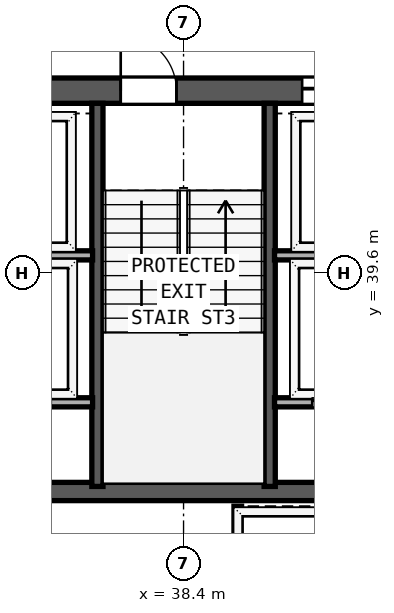
"""IFC4 building model, lengths in metres.
Left out: names, types, materials, properties, quantities, classifications, styles, units other than length and angle.
Written with IfcOpenShell. Run it as: python <this file> out.ifc"""

import sys

from ifc_helpers import new_model, si_unit, direction, frame, frame_2d, origin, place, context, subcontext, project, spatial, rectangle, extrude, element, fill, save


model = new_model("IFC4")
c1 = context("Model", 3, precision=1e-05, world=origin(), true_north=direction((0.0, 1.0)))
c2 = subcontext(c1, "Body", "Model", "MODEL_VIEW")
j1 = project(units=[si_unit("LENGTHUNIT", "METRE"), si_unit("PLANEANGLEUNIT", "RADIAN")], contexts=[c1])
p1 = place(None, origin())
s1 = spatial("IfcSite", under=j1, at=p1, CompositionType="ELEMENT")
p2 = place(p1, origin())
s2 = spatial("IfcBuilding", under=s1, at=p2, CompositionType="ELEMENT")
p3 = place(p2, frame((0.0, 0.0, 258.3)))
s3 = spatial("IfcBuildingStorey", under=s2, at=p3, CompositionType="ELEMENT", Elevation=258.3)
p4 = place(p3, frame((29.75, 43.2, 0.0), z_axis=(0.0, 0.0, 1.0), x_axis=(1.0, 0.0, 0.0)))
e1 = element("IfcWall", 1, at=p4, inside=s3, PredefinedType="SHEAR", context=c2, shape_type="SweptSolid", body=[
    extrude(rectangle(XDim=17.3, YDim=0.5, at=frame_2d((8.65, 0.0))), origin(), (0.0, 0.0, 1.0), 3.67),
])
p5 = place(p4, frame((2.3, 0.0, 0.0)))
e2 = element("IfcOpeningElement", 2, at=p5, cuts=e1, PredefinedType="OPENING", context=c2, shape_type="SweptSolid", body=[
    extrude(rectangle(XDim=1.1, YDim=2.15, at=frame_2d((0.55, 1.075))), frame((0.0, 0.26, 0.0), z_axis=(0.0, -1.0, 0.0), x_axis=(1.0, 0.0, 0.0)), (0.0, 0.0, 1.0), 0.52),
])
p6 = place(p4, frame((7.41, 0.0, 0.0)))
e3 = element("IfcOpeningElement", 3, at=p6, cuts=e1, PredefinedType="OPENING", context=c2, shape_type="SweptSolid", body=[
    extrude(rectangle(XDim=1.1, YDim=2.15, at=frame_2d((0.55, 1.075))), frame((0.0, 0.26, 0.0), z_axis=(0.0, -1.0, 0.0), x_axis=(1.0, 0.0, 0.0)), (0.0, 0.0, 1.0), 0.52),
])
p7 = place(p4, frame((13.5, 0.0, 0.0)))
e4 = element("IfcOpeningElement", 4, at=p7, cuts=e1, PredefinedType="OPENING", context=c2, shape_type="SweptSolid", body=[
    extrude(rectangle(XDim=1.1, YDim=2.15, at=frame_2d((0.55, 1.075))), frame((0.0, 0.26, 0.0), z_axis=(0.0, -1.0, 0.0), x_axis=(1.0, 0.0, 0.0)), (0.0, 0.0, 1.0), 0.52),
])
p8 = place(p4, frame((4.63, 0.0, 0.0)))
e5 = element("IfcOpeningElement", 5, at=p8, cuts=e1, PredefinedType="OPENING", context=c2, shape_type="SweptSolid", body=[
    extrude(rectangle(XDim=1.1, YDim=2.2, at=frame_2d((0.55, 1.1))), frame((0.0, 0.26, 0.0), z_axis=(0.0, -1.0, 0.0), x_axis=(1.0, 0.0, 0.0)), (0.0, 0.0, 1.0), 0.52),
])
p9 = place(p4, frame((10.99, 0.0, 0.0)))
e6 = element("IfcOpeningElement", 6, at=p9, cuts=e1, PredefinedType="OPENING", context=c2, shape_type="SweptSolid", body=[
    extrude(rectangle(XDim=1.1, YDim=2.2, at=frame_2d((0.55, 1.1))), frame((0.0, 0.26, 0.0), z_axis=(0.0, -1.0, 0.0), x_axis=(1.0, 0.0, 0.0)), (0.0, 0.0, 1.0), 0.52),
])
p10 = place(p3, frame((30.25, 35.29, 0.0), z_axis=(0.0, 0.0, 1.0), x_axis=(1.0, 0.0, 0.0)))
e7 = element("IfcWall", 7, at=p10, inside=s3, PredefinedType="SHEAR", context=c2, shape_type="SweptSolid", body=[
    extrude(rectangle(XDim=16.3, YDim=0.36, at=frame_2d((8.15, 0.0))), origin(), (0.0, 0.0, 1.0), 3.67),
])
p11 = place(p10, frame((5.1, 0.0, 0.0), z_axis=(0.0, 0.0, 1.0), x_axis=(-1.0, 0.0, 0.0)))
e8 = element("IfcOpeningElement", 8, at=p11, cuts=e7, PredefinedType="OPENING", context=c2, shape_type="SweptSolid", body=[
    extrude(rectangle(XDim=0.9, YDim=2.1, at=frame_2d((0.45, 1.05))), frame((0.0, 0.19, 0.0), z_axis=(0.0, -1.0, 0.0), x_axis=(1.0, 0.0, 0.0)), (0.0, 0.0, 1.0), 0.38),
])
p12 = place(p10, frame((12.16, 0.0, 0.0), z_axis=(0.0, 0.0, 1.0), x_axis=(-1.0, 0.0, 0.0)))
e9 = element("IfcOpeningElement", 9, at=p12, cuts=e7, PredefinedType="OPENING", context=c2, shape_type="SweptSolid", body=[
    extrude(rectangle(XDim=0.9, YDim=2.1, at=frame_2d((0.45, 1.05))), frame((0.0, 0.19, 0.0), z_axis=(0.0, -1.0, 0.0), x_axis=(1.0, 0.0, 0.0)), (0.0, 0.0, 1.0), 0.38),
])
for number, where, z_axis, x_axis in (
    (10, (36.7, 35.39, 0.0), (0.0, 0.0, 1.0), (0.0, 1.0, 0.0)),
    (11, (40.1, 35.39, 0.0), (0.0, 0.0, 1.0), (0.0, 1.0, 0.0)),
):
    element("IfcWall", number, at=place(p3, frame(where, z_axis=z_axis, x_axis=x_axis)), inside=s3, PredefinedType="SHEAR", context=c2, shape_type="SweptSolid", body=[
        extrude(rectangle(XDim=7.56, YDim=0.22, at=frame_2d((3.78, 0.0))), origin(), (0.0, 0.0, 1.0), 3.67),
    ])
for number, where, z_axis, x_axis in (
    (12, (33.835, 39.95, 0.0), (0.0, 0.0, 1.0), (1.0, 0.0, 0.0)),
    (13, (40.195, 39.95, 0.0), (0.0, 0.0, 1.0), (1.0, 0.0, 0.0)),
):
    element("IfcWall", number, at=place(p3, frame(where, z_axis=z_axis, x_axis=x_axis)), inside=s3, PredefinedType="SOLIDWALL", context=c2, shape_type="SweptSolid", body=[
        extrude(rectangle(XDim=2.77, YDim=0.18, at=frame_2d((1.385, 0.0))), origin(), (0.0, 0.0, 1.0), 3.67),
    ])
p13 = place(p3, frame((33.835, 37.05, 0.0), z_axis=(0.0, 0.0, 1.0), x_axis=(1.0, 0.0, 0.0)))
e14 = element("IfcWall", 14, at=p13, inside=s3, PredefinedType="SOLIDWALL", context=c2, shape_type="SweptSolid", body=[
    extrude(rectangle(XDim=2.77, YDim=0.18, at=frame_2d((1.385, 0.0))), origin(), (0.0, 0.0, 1.0), 3.67),
])
p14 = place(p13, frame((1.945, 0.0, 0.0), z_axis=(0.0, 0.0, 1.0), x_axis=(-1.0, 0.0, 0.0)))
e15 = element("IfcOpeningElement", 15, at=p14, cuts=e14, PredefinedType="OPENING", context=c2, shape_type="SweptSolid", body=[
    extrude(rectangle(XDim=1.2, YDim=2.2, at=frame_2d((0.6, 1.1))), frame((0.0, 0.1, 0.0), z_axis=(0.0, -1.0, 0.0), x_axis=(1.0, 0.0, 0.0)), (0.0, 0.0, 1.0), 0.2),
])
p15 = place(p3, frame((40.195, 37.05, 0.0), z_axis=(0.0, 0.0, 1.0), x_axis=(1.0, 0.0, 0.0)))
e16 = element("IfcWall", 16, at=p15, inside=s3, PredefinedType="SOLIDWALL", context=c2, shape_type="SweptSolid", body=[
    extrude(rectangle(XDim=2.77, YDim=0.18, at=frame_2d((1.385, 0.0))), origin(), (0.0, 0.0, 1.0), 3.67),
])
p16 = place(p15, frame((1.945, 0.0, 0.0), z_axis=(0.0, 0.0, 1.0), x_axis=(-1.0, 0.0, 0.0)))
e17 = element("IfcOpeningElement", 17, at=p16, cuts=e16, PredefinedType="OPENING", context=c2, shape_type="SweptSolid", body=[
    extrude(rectangle(XDim=1.2, YDim=2.2, at=frame_2d((0.6, 1.1))), frame((0.0, 0.1, 0.0), z_axis=(0.0, -1.0, 0.0), x_axis=(1.0, 0.0, 0.0)), (0.0, 0.0, 1.0), 0.2),
])
p17 = place(p3, frame((39.47, 32.95, 0.0), z_axis=(0.0, 0.0, 1.0), x_axis=(0.0, 1.0, 0.0)))
e18 = element("IfcWall", 18, at=p17, inside=s3, PredefinedType="SOLIDWALL", context=c2, shape_type="SweptSolid", body=[
    extrude(rectangle(XDim=2.05, YDim=0.15, at=frame_2d((1.025, 0.0))), origin(), (0.0, 0.0, 1.0), 3.67),
])
p18 = place(p6, origin())
e19 = element("IfcDoor", 19, at=p18, inside=s3, OperationType="SINGLE_SWING_LEFT", PredefinedType="DOOR", context=c2, shape_type="SweptSolid", body=[
    extrude(rectangle(XDim=1.1, YDim=2.15, at=frame_2d((0.55, 1.075))), frame((0.0, 0.185, 0.0), z_axis=(0.0, -1.0, 0.0), x_axis=(1.0, 0.0, 0.0)), (0.0, 0.0, 1.0), 0.05),
])
fill(e3, e19)
p19 = place(p9, origin())
e20 = element("IfcDoor", 20, at=p19, inside=s3, OperationType="SLIDING_TO_LEFT", PredefinedType="DOOR", context=c2, shape_type="SweptSolid", body=[
    extrude(rectangle(XDim=1.1, YDim=2.2, at=frame_2d((0.55, 1.1))), frame((0.0, 0.185, 0.0), z_axis=(0.0, -1.0, 0.0), x_axis=(1.0, 0.0, 0.0)), (0.0, 0.0, 1.0), 0.05),
])
fill(e6, e20)
p20 = place(p16, origin())
e21 = element("IfcDoor", 21, at=p20, inside=s3, OperationType="SLIDING_TO_RIGHT", PredefinedType="DOOR", context=c2, shape_type="SweptSolid", body=[
    extrude(rectangle(XDim=1.2, YDim=2.2, at=frame_2d((0.6, 1.1))), frame((0.0, 0.025, 0.0), z_axis=(0.0, -1.0, 0.0), x_axis=(1.0, 0.0, 0.0)), (0.0, 0.0, 1.0), 0.05),
])
fill(e17, e21)
save(model, sys.argv[1])
